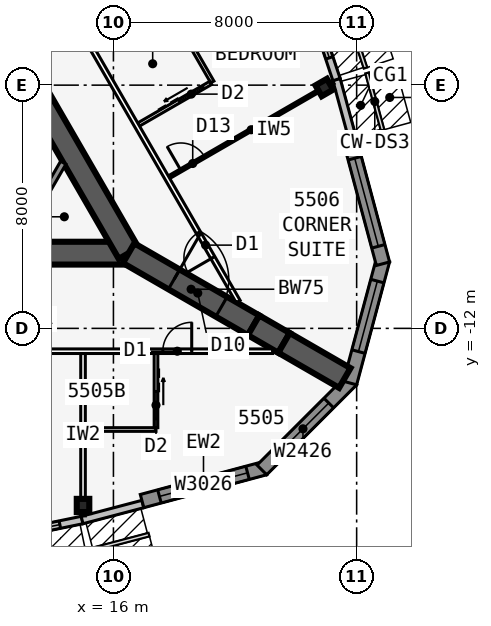
"""IFC4 building model, lengths in metres.
Left out: names, types, materials, properties, quantities, classifications, styles, units other than length and angle.
Written with IfcOpenShell. Run it as: python <this file> out.ifc"""

import sys

from ifc_helpers import new_model, si_unit, direction, frame, frame_2d, origin, origin_2d, place, context, subcontext, project, spatial, polyline, rectangle, i_section, outline, extrude, element, fill, save


model = new_model("IFC4")
c1 = context("Model", 3, precision=1e-05, world=origin(), true_north=direction((0.0, 1.0)))
c2 = subcontext(c1, "Body", "Model", "MODEL_VIEW")
j1 = project(units=[si_unit("LENGTHUNIT", "METRE"), si_unit("PLANEANGLEUNIT", "RADIAN")], contexts=[c1])
p1 = place(None, origin())
s1 = spatial("IfcSite", under=j1, at=p1, CompositionType="ELEMENT")
p2 = place(p1, origin())
s2 = spatial("IfcBuilding", under=s1, at=p2, CompositionType="ELEMENT")
p3 = place(p2, frame((0.0, 0.0, 208.1)))
s3 = spatial("IfcBuildingStorey", under=s2, at=p3, CompositionType="ELEMENT", Elevation=208.1)
p4 = place(p3, frame((-16.5, -9.526, 0.0), z_axis=(0.0, 0.0, 1.0), x_axis=(1.0, 0.0, 0.0)))
e1 = element("IfcWall", 1, at=p4, inside=s3, PredefinedType="SHEAR", context=c2, shape_type="SweptSolid", body=[
    extrude(rectangle(XDim=33.0, YDim=0.75, at=frame_2d((16.5, 0.0))), origin(), (0.0, 0.0, 1.0), 3.6),
])
p5 = place(p4, frame((14.05, 0.0, 0.0)))
e2 = element("IfcOpeningElement", 2, at=p5, cuts=e1, PredefinedType="OPENING", context=c2, shape_type="SweptSolid", body=[
    extrude(rectangle(XDim=1.8, YDim=2.13, at=frame_2d((0.9, 1.065))), frame((0.0, 0.385, 0.0), z_axis=(0.0, -1.0, 0.0), x_axis=(1.0, 0.0, 0.0)), (0.0, 0.0, 1.0), 0.77),
])
p6 = place(p3, frame((16.5, -9.526, 0.0), z_axis=(0.0, 0.0, 1.0), x_axis=(-0.499999749417, 0.866025548458, 0.0)))
e3 = element("IfcWall", 3, at=p6, inside=s3, PredefinedType="SHEAR", context=c2, shape_type="SweptSolid", body=[
    extrude(rectangle(XDim=33.0, YDim=0.75, at=frame_2d((16.5, 0.0))), origin(), (0.0, 0.0, 1.0), 3.6),
])
p7 = place(p6, frame((14.15, 0.0, 0.0)))
e4 = element("IfcOpeningElement", 4, at=p7, cuts=e3, PredefinedType="OPENING", context=c2, shape_type="SweptSolid", body=[
    extrude(rectangle(XDim=1.8, YDim=2.13, at=frame_2d((0.9, 1.065))), frame((0.0, 0.385, 0.0), z_axis=(0.0, -1.0, 0.0), x_axis=(1.0, 0.0, 0.0)), (0.0, 0.0, 1.0), 0.77),
])
p8 = place(p6, frame((12.6, 0.0, 0.0)))
e5 = element("IfcOpeningElement", 5, at=p8, cuts=e3, PredefinedType="OPENING", context=c2, shape_type="SweptSolid", body=[
    extrude(rectangle(XDim=1.0, YDim=2.13, at=frame_2d((0.5, 1.065))), frame((0.0, 0.385, 0.0), z_axis=(0.0, -1.0, 0.0), x_axis=(1.0, 0.0, 0.0)), (0.0, 0.0, 1.0), 0.77),
])
p9 = place(p3, frame((16.5, -9.526, 0.0), z_axis=(0.0, 0.0, 1.0), x_axis=(0.866031398331, -0.499989616998, 0.0)))
e6 = element("IfcWall", 6, at=p9, inside=s3, PredefinedType="SHEAR", context=c2, shape_type="SweptSolid", body=[
    extrude(rectangle(XDim=4.746, YDim=0.75, at=frame_2d((2.373, 0.0))), origin(), (0.0, 0.0, 1.0), 3.6),
])
p10 = place(p9, frame((1.725, 0.0, 0.0)))
e7 = element("IfcOpeningElement", 7, at=p10, cuts=e6, PredefinedType="OPENING", context=c2, shape_type="SweptSolid", body=[
    extrude(rectangle(XDim=1.8, YDim=2.13, at=frame_2d((0.9, 1.065))), frame((0.0, 0.385, 0.0), z_axis=(0.0, -1.0, 0.0), x_axis=(1.0, 0.0, 0.0)), (0.0, 0.0, 1.0), 0.77),
])
p11 = place(p3, frame((20.61, -11.899, 0.0), z_axis=(0.0, 0.0, 1.0), x_axis=(0.866009537788, -0.500027479704, 0.0)))
e8 = element("IfcWall", 8, at=p11, inside=s3, PredefinedType="SHEAR", context=c2, shape_type="SweptSolid", body=[
    extrude(rectangle(XDim=1.155, YDim=0.75, at=frame_2d((0.577, 0.0))), origin(), (0.0, 0.0, 1.0), 3.6),
])
p12 = place(p3, frame((21.61, -12.477, 0.0), z_axis=(0.0, 0.0, 1.0), x_axis=(0.866055313784, -0.499948190782, 0.0)))
e9 = element("IfcWall", 9, at=p12, inside=s3, PredefinedType="SHEAR", context=c2, shape_type="SweptSolid", body=[
    extrude(rectangle(XDim=2.309, YDim=0.75, at=frame_2d((1.155, 0.0))), origin(), (0.0, 0.0, 1.0), 3.6),
])
for number, where, z_axis, x_axis in (
    (10, (15.0, -17.825, 0.0), (0.0, 0.0, 1.0), (1.0, 0.0, 0.0)),
    (11, (22.937, -4.078, 0.0), (0.0, 0.0, 1.0), (-0.5, 0.866, 0.0)),
):
    element("IfcColumn", number, at=place(p3, frame(where, z_axis=z_axis, x_axis=x_axis)), inside=s3, PredefinedType="COLUMN", context=c2, shape_type="SweptSolid", body=[
        extrude(i_section(OverallWidth=0.411, OverallDepth=0.434, WebThickness=0.036, FlangeThickness=0.057, at=origin_2d()), origin(), (0.0, 0.0, 1.0), 3.6),
    ])
p13 = place(p3, frame((9.975, -19.332, 0.0), z_axis=(0.0, 0.0, 1.0), x_axis=(0.979461488189, 0.201631329795, 0.0)))
e12 = element("IfcWall", 12, at=p13, inside=s3, PredefinedType="STANDARD", context=c2, shape_type="SweptSolid", body=[
    extrude(rectangle(XDim=5.105, YDim=0.25, at=frame_2d((2.552, 0.0))), origin(), (0.0, 0.0, 1.0), 3.435),
])
p14 = place(p13, frame((0.752, 0.0, 0.45)))
e13 = element("IfcOpeningElement", 13, at=p14, cuts=e12, PredefinedType="OPENING", context=c2, shape_type="SweptSolid", body=[
    extrude(rectangle(XDim=3.6, YDim=2.6, at=frame_2d((1.8, 1.3))), frame((0.0, 0.135, 0.0), z_axis=(0.0, -1.0, 0.0), x_axis=(1.0, 0.0, 0.0)), (0.0, 0.0, 1.0), 0.27),
])
p15 = place(p3, frame((14.968, -18.304, 0.0), z_axis=(0.0, 0.0, 1.0), x_axis=(0.967010286052, 0.254737328772, 0.0)))
e14 = element("IfcWall", 14, at=p15, inside=s3, PredefinedType="STANDARD", context=c2, shape_type="SweptSolid", body=[
    extrude(rectangle(XDim=2.068, YDim=0.25, at=frame_2d((1.034, 0.0))), origin(), (0.0, 0.0, 1.0), 3.435),
])
p16 = place(p3, frame((16.942, -17.681, 0.0), z_axis=(0.0, 0.0, 1.0), x_axis=(0.965920442324, 0.258839137498, 0.0)))
e15 = element("IfcWall", 15, at=p16, inside=s3, PredefinedType="SOLIDWALL", context=c2, shape_type="SweptSolid", body=[
    extrude(rectangle(XDim=4.184, YDim=0.45, at=frame_2d((2.092, 0.0))), origin(), (0.0, 0.0, 1.0), 3.435),
])
p17 = place(p16, frame((0.592, 0.0, 0.45)))
e16 = element("IfcOpeningElement", 16, at=p17, cuts=e15, PredefinedType="OPENING", context=c2, shape_type="SweptSolid", body=[
    extrude(rectangle(XDim=3.0, YDim=2.6, at=frame_2d((1.5, 1.3))), frame((0.0, 0.235, 0.0), z_axis=(0.0, -1.0, 0.0), x_axis=(1.0, 0.0, 0.0)), (0.0, 0.0, 1.0), 0.47),
])
p18 = place(p3, frame((20.882, -16.656, 0.0), z_axis=(0.0, 0.0, 1.0), x_axis=(0.707077605902, 0.707135955267, 0.0)))
e17 = element("IfcWall", 17, at=p18, inside=s3, PredefinedType="SOLIDWALL", context=c2, shape_type="SweptSolid", body=[
    extrude(outline(polyline([(4.184, 0.225), (4.125, 0.225), (3.705, 0.113), (3.675, 0.225), (0.0, 0.225), (0.0, -0.225), (4.184, -0.225), (4.184, 0.225)])), origin(), (0.0, 0.0, 1.0), 3.435),
])
p19 = place(p18, frame((0.713, 0.0, 0.45)))
e18 = element("IfcOpeningElement", 18, at=p19, cuts=e17, PredefinedType="OPENING", context=c2, shape_type="SweptSolid", body=[
    extrude(rectangle(XDim=2.4, YDim=2.6, at=frame_2d((1.2, 1.3))), frame((0.0, 0.235, 0.0), z_axis=(0.0, -1.0, 0.0), x_axis=(1.0, 0.0, 0.0)), (0.0, 0.0, 1.0), 0.47),
])
p20 = place(p3, frame((23.783, -13.798, 0.0), z_axis=(0.0, 0.0, 1.0), x_axis=(0.258799282522, 0.96593112144, 0.0)))
e19 = element("IfcWall", 19, at=p20, inside=s3, PredefinedType="SOLIDWALL", context=c2, shape_type="SweptSolid", body=[
    extrude(outline(polyline([(4.184, 0.225), (0.509, 0.225), (0.479, 0.113), (0.059, 0.225), (0.0, 0.225), (0.0, -0.225), (4.184, -0.225), (4.184, 0.225)])), origin(), (0.0, 0.0, 1.0), 3.435),
])
p21 = place(p20, frame((1.071, 0.0, 0.45)))
e20 = element("IfcOpeningElement", 20, at=p21, cuts=e19, PredefinedType="OPENING", context=c2, shape_type="SweptSolid", body=[
    extrude(rectangle(XDim=2.4, YDim=2.6, at=frame_2d((1.2, 1.3))), frame((0.0, 0.235, 0.0), z_axis=(0.0, -1.0, 0.0), x_axis=(1.0, 0.0, 0.0)), (0.0, 0.0, 1.0), 0.47),
])
p22 = place(p3, frame((24.865, -9.873, 0.0), z_axis=(0.0, 0.0, 1.0), x_axis=(-0.258784695888, 0.965935029479, 0.0)))
e21 = element("IfcWall", 21, at=p22, inside=s3, PredefinedType="SOLIDWALL", context=c2, shape_type="SweptSolid", body=[
    extrude(rectangle(XDim=4.184, YDim=0.45, at=frame_2d((2.092, 0.0))), origin(), (0.0, 0.0, 1.0), 3.435),
])
p23 = place(p22, frame((0.592, 0.0, 0.45)))
e22 = element("IfcOpeningElement", 22, at=p23, cuts=e21, PredefinedType="OPENING", context=c2, shape_type="SweptSolid", body=[
    extrude(rectangle(XDim=3.0, YDim=2.6, at=frame_2d((1.5, 1.3))), frame((0.0, 0.235, 0.0), z_axis=(0.0, -1.0, 0.0), x_axis=(1.0, 0.0, 0.0)), (0.0, 0.0, 1.0), 0.47),
])
p24 = place(p3, frame((23.879, -5.806, 0.0), z_axis=(0.0, 0.0, 1.0), x_axis=(-0.262867703986, 0.964831887015, 0.0)))
e23 = element("IfcWall", 23, at=p24, inside=s3, PredefinedType="STANDARD", context=c2, shape_type="SweptSolid", body=[
    extrude(rectangle(XDim=2.068, YDim=0.25, at=frame_2d((1.034, 0.0))), origin(), (0.0, 0.0, 1.0), 3.435),
])
p25 = place(p3, frame((23.338, -3.817, 0.0), z_axis=(0.0, 0.0, 1.0), x_axis=(-0.315108478109, 0.949055660656, 0.0)))
e24 = element("IfcWall", 24, at=p25, inside=s3, PredefinedType="STANDARD", context=c2, shape_type="SweptSolid", body=[
    extrude(rectangle(XDim=5.105, YDim=0.25, at=frame_2d((2.552, 0.0))), origin(), (0.0, 0.0, 1.0), 3.435),
])
p26 = place(p25, frame((0.752, 0.0, 0.45)))
e25 = element("IfcOpeningElement", 25, at=p26, cuts=e24, PredefinedType="OPENING", context=c2, shape_type="SweptSolid", body=[
    extrude(rectangle(XDim=3.6, YDim=2.6, at=frame_2d((1.8, 1.3))), frame((0.0, 0.135, 0.0), z_axis=(0.0, -1.0, 0.0), x_axis=(1.0, 0.0, 0.0)), (0.0, 0.0, 1.0), 0.27),
])
p27 = place(p3, frame((-21.236, -12.751, 0.0), z_axis=(0.0, 0.0, 1.0), x_axis=(1.0, 0.0, 0.0)))
e26 = element("IfcWall", 26, at=p27, inside=s3, PredefinedType="PARTITIONING", context=c2, shape_type="SweptSolid", body=[
    extrude(rectangle(XDim=42.472, YDim=0.15, at=frame_2d((21.236, 0.0))), origin(), (0.0, 0.0, 1.0), 3.435),
])
p28 = place(p27, frame((2.661, 0.0, 0.0)))
e27 = element("IfcOpeningElement", 27, at=p28, cuts=e26, PredefinedType="OPENING", context=c2, shape_type="SweptSolid", body=[
    extrude(rectangle(XDim=0.95, YDim=2.13, at=frame_2d((0.475, 1.065))), frame((0.0, 0.085, 0.0), z_axis=(0.0, -1.0, 0.0), x_axis=(1.0, 0.0, 0.0)), (0.0, 0.0, 1.0), 0.17),
])
p29 = place(p27, frame((8.261, 0.0, 0.0)))
e28 = element("IfcOpeningElement", 28, at=p29, cuts=e26, PredefinedType="OPENING", context=c2, shape_type="SweptSolid", body=[
    extrude(rectangle(XDim=0.95, YDim=2.13, at=frame_2d((0.475, 1.065))), frame((0.0, 0.085, 0.0), z_axis=(0.0, -1.0, 0.0), x_axis=(1.0, 0.0, 0.0)), (0.0, 0.0, 1.0), 0.17),
])
p30 = place(p27, frame((18.861, 0.0, 0.0)))
e29 = element("IfcOpeningElement", 29, at=p30, cuts=e26, PredefinedType="OPENING", context=c2, shape_type="SweptSolid", body=[
    extrude(rectangle(XDim=0.95, YDim=2.13, at=frame_2d((0.475, 1.065))), frame((0.0, 0.085, 0.0), z_axis=(0.0, -1.0, 0.0), x_axis=(1.0, 0.0, 0.0)), (0.0, 0.0, 1.0), 0.17),
])
p31 = place(p27, frame((23.236, 0.0, 0.0)))
e30 = element("IfcOpeningElement", 30, at=p31, cuts=e26, PredefinedType="OPENING", context=c2, shape_type="SweptSolid", body=[
    extrude(rectangle(XDim=1.0, YDim=2.13, at=frame_2d((0.5, 1.065))), frame((0.0, 0.085, 0.0), z_axis=(0.0, -1.0, 0.0), x_axis=(1.0, 0.0, 0.0)), (0.0, 0.0, 1.0), 0.17),
])
p32 = place(p27, frame((29.461, 0.0, 0.0)))
e31 = element("IfcOpeningElement", 31, at=p32, cuts=e26, PredefinedType="OPENING", context=c2, shape_type="SweptSolid", body=[
    extrude(rectangle(XDim=0.95, YDim=2.13, at=frame_2d((0.475, 1.065))), frame((0.0, 0.085, 0.0), z_axis=(0.0, -1.0, 0.0), x_axis=(1.0, 0.0, 0.0)), (0.0, 0.0, 1.0), 0.17),
])
p33 = place(p27, frame((38.861, 0.0, 0.0)))
e32 = element("IfcOpeningElement", 32, at=p33, cuts=e26, PredefinedType="OPENING", context=c2, shape_type="SweptSolid", body=[
    extrude(rectangle(XDim=0.95, YDim=2.13, at=frame_2d((0.475, 1.065))), frame((0.0, 0.085, 0.0), z_axis=(0.0, -1.0, 0.0), x_axis=(1.0, 0.0, 0.0)), (0.0, 0.0, 1.0), 0.17),
])
p34 = place(p3, frame((15.0, -12.826, 0.0), z_axis=(0.0, 0.0, 1.0), x_axis=(0.0, -1.0, 0.0)))
e33 = element("IfcWall", 33, at=p34, inside=s3, PredefinedType="PARTITIONING", context=c2, shape_type="SweptSolid", body=[
    extrude(rectangle(XDim=5.34, YDim=0.15, at=frame_2d((2.67, 0.0))), origin(), (0.0, 0.0, 1.0), 2.589),
])
p35 = place(p3, frame((15.0, -15.326, 0.0), z_axis=(0.0, 0.0, 1.0), x_axis=(1.0, 0.0, 0.0)))
e34 = element("IfcWall", 34, at=p35, inside=s3, PredefinedType="PLUMBINGWALL", context=c2, shape_type="SweptSolid", body=[
    extrude(rectangle(XDim=2.4, YDim=0.12, at=frame_2d((1.2, 0.0))), origin(), (0.0, 0.0, 1.0), 3.435),
])
p36 = place(p3, frame((17.4, -12.826, 0.0), z_axis=(0.0, 0.0, 1.0), x_axis=(0.0, -1.0, 0.0)))
e35 = element("IfcWall", 35, at=p36, inside=s3, PredefinedType="PLUMBINGWALL", context=c2, shape_type="SweptSolid", body=[
    extrude(rectangle(XDim=2.44, YDim=0.12, at=frame_2d((1.22, 0.0))), origin(), (0.0, 0.0, 1.0), 3.435),
])
p37 = place(p36, frame((1.25, 0.0, 0.0)))
e36 = element("IfcOpeningElement", 36, at=p37, cuts=e35, PredefinedType="OPENING", context=c2, shape_type="SweptSolid", body=[
    extrude(rectangle(XDim=0.9, YDim=2.13, at=frame_2d((0.45, 1.065))), frame((0.0, 0.07, 0.0), z_axis=(0.0, -1.0, 0.0), x_axis=(1.0, 0.0, 0.0)), (0.0, 0.0, 1.0), 0.14),
])
p38 = place(p3, frame((20.102, -11.115, 0.0), z_axis=(0.0, 0.0, 1.0), x_axis=(-0.500000265775, 0.866025250339, 0.0)))
e37 = element("IfcWall", 37, at=p38, inside=s3, PredefinedType="PARTITIONING", context=c2, shape_type="SweptSolid", body=[
    extrude(rectangle(XDim=39.354, YDim=0.15, at=frame_2d((19.677, 0.0))), origin(), (0.0, 0.0, 1.0), 3.435),
])
p39 = place(p38, frame((1.665, 0.0, 0.0)))
e38 = element("IfcOpeningElement", 38, at=p39, cuts=e37, PredefinedType="OPENING", context=c2, shape_type="SweptSolid", body=[
    extrude(rectangle(XDim=0.95, YDim=2.13, at=frame_2d((0.475, 1.065))), frame((0.0, 0.085, 0.0), z_axis=(0.0, -1.0, 0.0), x_axis=(1.0, 0.0, 0.0)), (0.0, 0.0, 1.0), 0.17),
])
p40 = place(p38, frame((12.902, 0.0, 0.0)))
e39 = element("IfcOpeningElement", 39, at=p40, cuts=e37, PredefinedType="OPENING", context=c2, shape_type="SweptSolid", body=[
    extrude(rectangle(XDim=0.95, YDim=2.13, at=frame_2d((0.475, 1.065))), frame((0.0, 0.085, 0.0), z_axis=(0.0, -1.0, 0.0), x_axis=(1.0, 0.0, 0.0)), (0.0, 0.0, 1.0), 0.17),
])
p41 = place(p38, frame((17.302, 0.0, 0.0)))
e40 = element("IfcOpeningElement", 40, at=p41, cuts=e37, PredefinedType="OPENING", context=c2, shape_type="SweptSolid", body=[
    extrude(rectangle(XDim=0.95, YDim=2.13, at=frame_2d((0.475, 1.065))), frame((0.0, 0.085, 0.0), z_axis=(0.0, -1.0, 0.0), x_axis=(1.0, 0.0, 0.0)), (0.0, 0.0, 1.0), 0.17),
])
p42 = place(p38, frame((22.902, 0.0, 0.0)))
e41 = element("IfcOpeningElement", 41, at=p42, cuts=e37, PredefinedType="OPENING", context=c2, shape_type="SweptSolid", body=[
    extrude(rectangle(XDim=0.95, YDim=2.13, at=frame_2d((0.475, 1.065))), frame((0.0, 0.085, 0.0), z_axis=(0.0, -1.0, 0.0), x_axis=(1.0, 0.0, 0.0)), (0.0, 0.0, 1.0), 0.17),
])
p43 = place(p38, frame((32.302, 0.0, 0.0)))
e42 = element("IfcOpeningElement", 42, at=p43, cuts=e37, PredefinedType="OPENING", context=c2, shape_type="SweptSolid", body=[
    extrude(rectangle(XDim=0.95, YDim=2.13, at=frame_2d((0.475, 1.065))), frame((0.0, 0.085, 0.0), z_axis=(0.0, -1.0, 0.0), x_axis=(1.0, 0.0, 0.0)), (0.0, 0.0, 1.0), 0.17),
])
p44 = place(p38, frame((37.302, 0.0, 0.0)))
e43 = element("IfcOpeningElement", 43, at=p44, cuts=e37, PredefinedType="OPENING", context=c2, shape_type="SweptSolid", body=[
    extrude(rectangle(XDim=0.95, YDim=2.13, at=frame_2d((0.475, 1.065))), frame((0.0, 0.085, 0.0), z_axis=(0.0, -1.0, 0.0), x_axis=(1.0, 0.0, 0.0)), (0.0, 0.0, 1.0), 0.17),
])
p45 = place(p3, frame((17.829, -7.027, 0.0), z_axis=(0.0, 0.0, 1.0), x_axis=(0.866026604282, 0.499997920671, 0.0)))
e44 = element("IfcWall", 44, at=p45, inside=s3, PredefinedType="PARTITIONING", context=c2, shape_type="SweptSolid", body=[
    extrude(rectangle(XDim=6.24, YDim=0.1, at=frame_2d((3.12, 0.0))), origin(), (0.0, 0.0, 1.0), 2.589),
])
p46 = place(p45, frame((0.45, 0.0, 0.0)))
e45 = element("IfcOpeningElement", 45, at=p46, cuts=e44, PredefinedType="OPENING", context=c2, shape_type="SweptSolid", body=[
    extrude(rectangle(XDim=0.9, YDim=2.13, at=frame_2d((0.45, 1.065))), frame((0.0, 0.06, 0.0), z_axis=(0.0, -1.0, 0.0), x_axis=(1.0, 0.0, 0.0)), (0.0, 0.0, 1.0), 0.12),
])
p47 = place(p3, frame((19.253, -3.895, 0.0), z_axis=(0.0, 0.0, 1.0), x_axis=(-0.499990139034, 0.866031096941, 0.0)))
e46 = element("IfcWall", 46, at=p47, inside=s3, PredefinedType="PLUMBINGWALL", context=c2, shape_type="SweptSolid", body=[
    extrude(rectangle(XDim=3.0, YDim=0.12, at=frame_2d((1.5, 0.0))), origin(), (0.0, 0.0, 1.0), 3.435),
])
p48 = place(p3, frame((16.829, -5.295, 0.0), z_axis=(0.0, 0.0, 1.0), x_axis=(0.866035715982, 0.499982138324, 0.0)))
e47 = element("IfcWall", 47, at=p48, inside=s3, PredefinedType="PLUMBINGWALL", context=c2, shape_type="SweptSolid", body=[
    extrude(rectangle(XDim=2.74, YDim=0.12, at=frame_2d((1.37, 0.0))), origin(), (0.0, 0.0, 1.0), 3.435),
])
p49 = place(p48, frame((1.55, 0.0, 0.0)))
e48 = element("IfcOpeningElement", 48, at=p49, cuts=e47, PredefinedType="OPENING", context=c2, shape_type="SweptSolid", body=[
    extrude(rectangle(XDim=0.9, YDim=2.13, at=frame_2d((0.45, 1.065))), frame((0.0, 0.07, 0.0), z_axis=(0.0, -1.0, 0.0), x_axis=(1.0, 0.0, 0.0)), (0.0, 0.0, 1.0), 0.14),
])
p50 = place(p3, frame((14.349, -6.551, 0.0), z_axis=(0.0, 0.0, 1.0), x_axis=(-0.499952404951, -0.866052881055, 0.0)))
e49 = element("IfcWall", 49, at=p50, inside=s3, PredefinedType="SOLIDWALL", context=c2, shape_type="SweptSolid", body=[
    extrude(rectangle(XDim=3.002, YDim=0.2, at=frame_2d((1.501, 0.0))), origin(), (0.0, 0.0, 1.0), 3.435),
])
p51 = place(p14, origin())
e50 = element("IfcWindow", 50, at=p51, inside=s3, PartitioningType="SINGLE_PANEL", PredefinedType="WINDOW", context=c2, shape_type="SweptSolid", body=[
    extrude(rectangle(XDim=3.6, YDim=2.6, at=frame_2d((1.8, 1.3))), frame((0.0, 0.03, 0.0), z_axis=(0.0, -1.0, 0.0), x_axis=(1.0, 0.0, 0.0)), (0.0, 0.0, 1.0), 0.06),
])
fill(e13, e50)
p52 = place(p17, origin())
e51 = element("IfcWindow", 51, at=p52, inside=s3, PartitioningType="SINGLE_PANEL", PredefinedType="WINDOW", context=c2, shape_type="SweptSolid", body=[
    extrude(rectangle(XDim=3.0, YDim=2.6, at=frame_2d((1.5, 1.3))), frame((0.0, 0.03, 0.0), z_axis=(0.0, -1.0, 0.0), x_axis=(1.0, 0.0, 0.0)), (0.0, 0.0, 1.0), 0.06),
])
fill(e16, e51)
p53 = place(p19, origin())
e52 = element("IfcWindow", 52, at=p53, inside=s3, PartitioningType="SINGLE_PANEL", PredefinedType="WINDOW", context=c2, shape_type="SweptSolid", body=[
    extrude(rectangle(XDim=2.4, YDim=2.6, at=frame_2d((1.2, 1.3))), frame((0.0, 0.03, 0.0), z_axis=(0.0, -1.0, 0.0), x_axis=(1.0, 0.0, 0.0)), (0.0, 0.0, 1.0), 0.06),
])
fill(e18, e52)
p54 = place(p21, origin())
e53 = element("IfcWindow", 53, at=p54, inside=s3, PartitioningType="SINGLE_PANEL", PredefinedType="WINDOW", context=c2, shape_type="SweptSolid", body=[
    extrude(rectangle(XDim=2.4, YDim=2.6, at=frame_2d((1.2, 1.3))), frame((0.0, 0.03, 0.0), z_axis=(0.0, -1.0, 0.0), x_axis=(1.0, 0.0, 0.0)), (0.0, 0.0, 1.0), 0.06),
])
fill(e20, e53)
p55 = place(p23, origin())
e54 = element("IfcWindow", 54, at=p55, inside=s3, PartitioningType="SINGLE_PANEL", PredefinedType="WINDOW", context=c2, shape_type="SweptSolid", body=[
    extrude(rectangle(XDim=3.0, YDim=2.6, at=frame_2d((1.5, 1.3))), frame((0.0, 0.03, 0.0), z_axis=(0.0, -1.0, 0.0), x_axis=(1.0, 0.0, 0.0)), (0.0, 0.0, 1.0), 0.06),
])
fill(e22, e54)
p56 = place(p26, origin())
e55 = element("IfcWindow", 55, at=p56, inside=s3, PartitioningType="SINGLE_PANEL", PredefinedType="WINDOW", context=c2, shape_type="SweptSolid", body=[
    extrude(rectangle(XDim=3.6, YDim=2.6, at=frame_2d((1.8, 1.3))), frame((0.0, 0.03, 0.0), z_axis=(0.0, -1.0, 0.0), x_axis=(1.0, 0.0, 0.0)), (0.0, 0.0, 1.0), 0.06),
])
fill(e25, e55)
p57 = place(p37, origin())
e56 = element("IfcDoor", 56, at=p57, inside=s3, OperationType="SLIDING_TO_LEFT", PredefinedType="DOOR", context=c2, shape_type="SweptSolid", body=[
    extrude(rectangle(XDim=0.9, YDim=2.13, at=frame_2d((0.45, 1.065))), frame((0.0, 0.025, 0.0), z_axis=(0.0, -1.0, 0.0), x_axis=(1.0, 0.0, 0.0)), (0.0, 0.0, 1.0), 0.05),
])
fill(e36, e56)
p58 = place(p33, origin())
e57 = element("IfcDoor", 57, at=p58, inside=s3, OperationType="SINGLE_SWING_RIGHT", PredefinedType="DOOR", context=c2, shape_type="SweptSolid", body=[
    extrude(rectangle(XDim=0.95, YDim=2.13, at=frame_2d((0.475, 1.065))), frame((0.0, 0.025, 0.0), z_axis=(0.0, -1.0, 0.0), x_axis=(1.0, 0.0, 0.0)), (0.0, 0.0, 1.0), 0.05),
])
fill(e32, e57)
p59 = place(p46, origin())
e58 = element("IfcDoor", 58, at=p59, inside=s3, OperationType="SINGLE_SWING_LEFT", PredefinedType="DOOR", context=c2, shape_type="SweptSolid", body=[
    extrude(rectangle(XDim=0.9, YDim=2.13, at=frame_2d((0.45, 1.065))), frame((0.0, 0.025, 0.0), z_axis=(0.0, -1.0, 0.0), x_axis=(1.0, 0.0, 0.0)), (0.0, 0.0, 1.0), 0.05),
])
fill(e45, e58)
p60 = place(p39, origin())
e59 = element("IfcDoor", 59, at=p60, inside=s3, OperationType="SINGLE_SWING_LEFT", PredefinedType="DOOR", context=c2, shape_type="SweptSolid", body=[
    extrude(rectangle(XDim=0.95, YDim=2.13, at=frame_2d((0.475, 1.065))), frame((0.0, 0.025, 0.0), z_axis=(0.0, -1.0, 0.0), x_axis=(1.0, 0.0, 0.0)), (0.0, 0.0, 1.0), 0.05),
])
fill(e38, e59)
p61 = place(p49, origin())
e60 = element("IfcDoor", 60, at=p61, inside=s3, OperationType="SLIDING_TO_LEFT", PredefinedType="DOOR", context=c2, shape_type="SweptSolid", body=[
    extrude(rectangle(XDim=0.9, YDim=2.13, at=frame_2d((0.45, 1.065))), frame((0.0, 0.025, 0.0), z_axis=(0.0, -1.0, 0.0), x_axis=(1.0, 0.0, 0.0)), (0.0, 0.0, 1.0), 0.05),
])
fill(e48, e60)
p62 = place(p10, origin())
e61 = element("IfcDoor", 61, at=p62, inside=s3, OperationType="DOUBLE_DOOR_DOUBLE_SWING", PredefinedType="DOOR", context=c2, shape_type="SweptSolid", body=[
    extrude(rectangle(XDim=1.8, YDim=2.13, at=frame_2d((0.9, 1.065))), frame((0.0, 0.025, 0.0), z_axis=(0.0, -1.0, 0.0), x_axis=(1.0, 0.0, 0.0)), (0.0, 0.0, 1.0), 0.05),
])
fill(e7, e61)
save(model, sys.argv[1])
